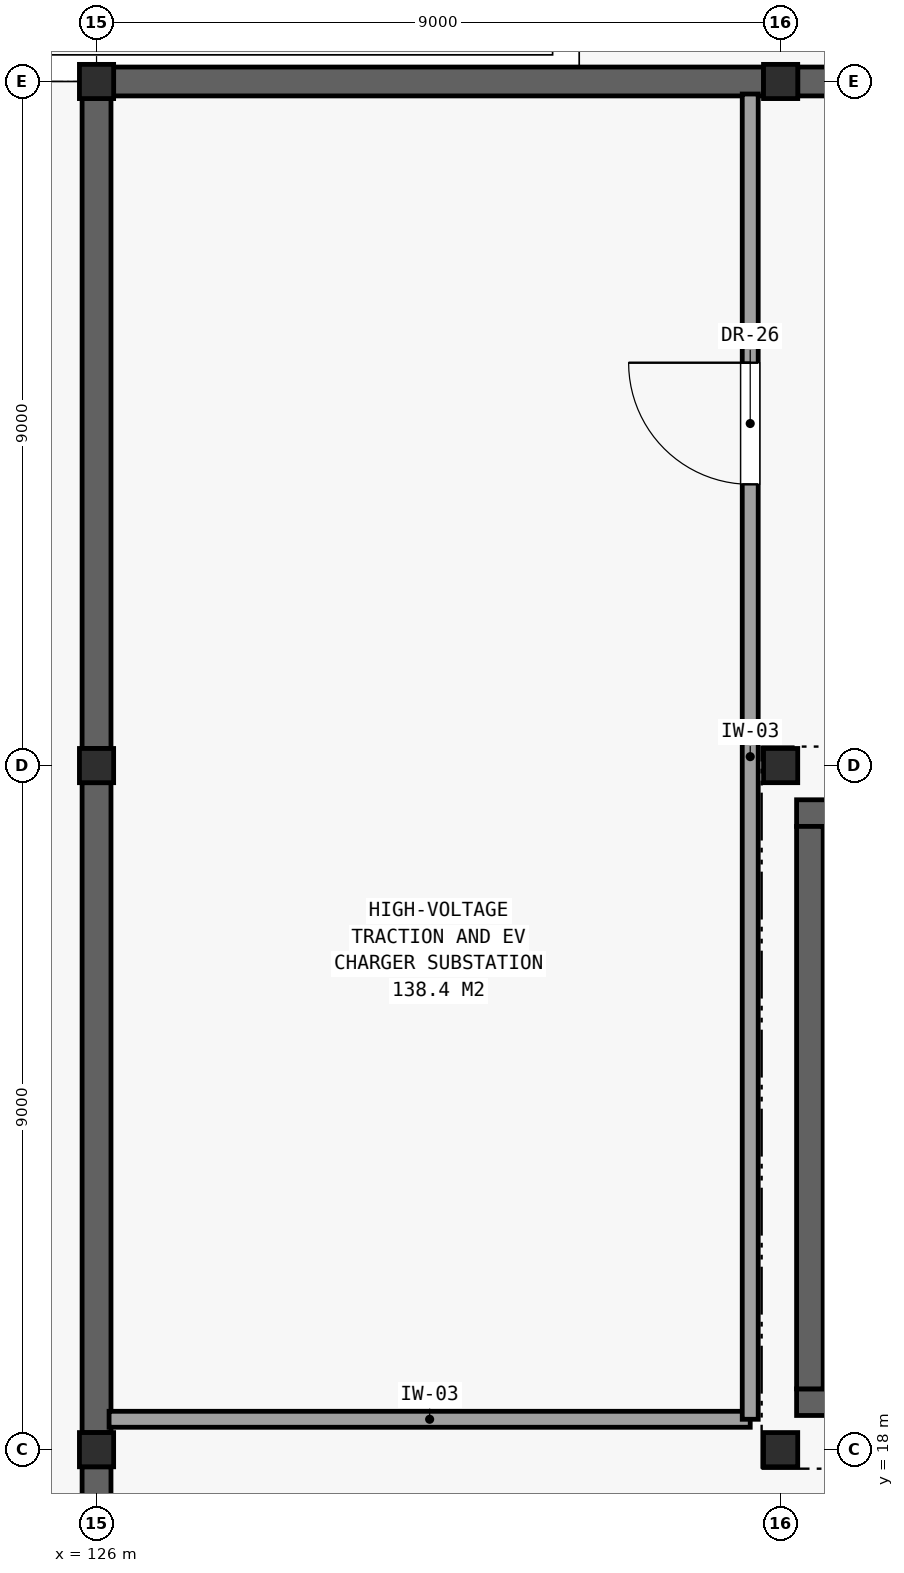
"""IFC4 building model, lengths in metres.
Left out: names, types, materials, properties, quantities, classifications, styles, units other than length and angle.
Written with IfcOpenShell. Run it as: python <this file> out.ifc"""

import sys

from ifc_helpers import new_model, si_unit, direction, frame, frame_2d, origin, origin_2d, place, context, subcontext, project, spatial, rectangle, hollow_rectangle, extrude, element, fill, save


model = new_model("IFC4")
c1 = context("Model", 3, precision=1e-05, world=origin(), true_north=direction((0.0, 1.0)))
c2 = subcontext(c1, "Body", "Model", "MODEL_VIEW")
j1 = project(units=[si_unit("LENGTHUNIT", "METRE"), si_unit("PLANEANGLEUNIT", "RADIAN")], contexts=[c1])
p1 = place(None, origin())
s1 = spatial("IfcSite", under=j1, at=p1, CompositionType="ELEMENT")
p2 = place(p1, origin())
s2 = spatial("IfcBuilding", under=s1, at=p2, CompositionType="ELEMENT")
p3 = place(p2, frame((0.0, 0.0, -4.8)))
s3 = spatial("IfcBuildingStorey", under=s2, at=p3, CompositionType="ELEMENT", Elevation=-4.8)
for number, where, z_axis, x_axis in (
    (1, (126.0, 18.0, 0.0), (0.0, 0.0, 1.0), (1.0, 0.0, 0.0)),
    (2, (126.0, 27.0, 0.0), (0.0, 0.0, 1.0), (1.0, 0.0, 0.0)),
    (3, (126.0, 36.0, 0.0), (0.0, 0.0, 1.0), (1.0, 0.0, 0.0)),
    (4, (135.0, 18.0, 0.0), (0.0, 0.0, 1.0), (1.0, 0.0, 0.0)),
    (5, (135.0, 27.0, 0.0), (0.0, 0.0, 1.0), (1.0, 0.0, 0.0)),
    (6, (135.0, 36.0, 0.0), (0.0, 0.0, 1.0), (1.0, 0.0, 0.0)),
):
    element("IfcColumn", number, at=place(p3, frame(where, z_axis=z_axis, x_axis=x_axis)), inside=s3, PredefinedType="COLUMN", context=c2, shape_type="SweptSolid", body=[
        extrude(hollow_rectangle(XDim=0.45, YDim=0.45, WallThickness=0.022, at=origin_2d()), origin(), (0.0, 0.0, 1.0), 4.8),
    ])
for number, where, z_axis, x_axis in (
    (7, (143.775, 36.0, 0.0), (0.0, 0.0, 1.0), (-1.0, 0.0, 0.0)),
    (8, (134.775, 36.0, 0.0), (0.0, 0.0, 1.0), (-1.0, 0.0, 0.0)),
    (9, (126.0, 35.775, 0.0), (0.0, 0.0, 1.0), (0.0, -1.0, 0.0)),
    (10, (126.0, 26.775, 0.0), (0.0, 0.0, 1.0), (0.0, -1.0, 0.0)),
    (11, (126.0, 17.775, 0.0), (0.0, 0.0, 1.0), (0.0, -1.0, 0.0)),
):
    element("IfcWall", number, at=place(p3, frame(where, z_axis=z_axis, x_axis=x_axis)), inside=s3, PredefinedType="USERDEFINED", context=c2, shape_type="SweptSolid", body=[
        extrude(rectangle(XDim=8.55, YDim=0.38, at=frame_2d((4.275, 0.0))), origin(), (0.0, 0.0, 1.0), 4.13),
    ])
for number, where, z_axis, x_axis in (
    (12, (135.21, 18.625, 0.0), (0.0, 0.0, 1.0), (1.0, 0.0, 0.0)),
    (13, (135.21, 26.375, 0.0), (0.0, 0.0, 1.0), (1.0, 0.0, 0.0)),
):
    element("IfcWall", number, at=place(p3, frame(where, z_axis=z_axis, x_axis=x_axis)), inside=s3, PredefinedType="SHEAR", context=c2, shape_type="SweptSolid", body=[
        extrude(rectangle(XDim=3.98, YDim=0.35, at=frame_2d((1.99, 0.0))), origin(), (0.0, 0.0, 1.0), 4.52),
    ])
p4 = place(p3, frame((135.385, 18.8, 0.0), z_axis=(0.0, 0.0, 1.0), x_axis=(0.0, 1.0, 0.0)))
e14 = element("IfcWall", 14, at=p4, inside=s3, PredefinedType="SHEAR", context=c2, shape_type="SweptSolid", body=[
    extrude(rectangle(XDim=7.4, YDim=0.35, at=frame_2d((3.7, 0.0))), origin(), (0.0, 0.0, 1.0), 4.52),
])
p5 = place(p3, frame((126.165, 18.4, 0.0), z_axis=(0.0, 0.0, 1.0), x_axis=(1.0, 0.0, 0.0)))
e15 = element("IfcWall", 15, at=p5, inside=s3, PredefinedType="PARTITIONING", context=c2, shape_type="SweptSolid", body=[
    extrude(rectangle(XDim=8.435, YDim=0.21, at=frame_2d((4.218, 0.0))), origin(), (0.0, 0.0, 1.0), 4.13),
])
p6 = place(p3, frame((134.6, 18.4, 0.0), z_axis=(0.0, 0.0, 1.0), x_axis=(0.0, 1.0, 0.0)))
e16 = element("IfcWall", 16, at=p6, inside=s3, PredefinedType="PARTITIONING", context=c2, shape_type="SweptSolid", body=[
    extrude(rectangle(XDim=17.435, YDim=0.21, at=frame_2d((8.718, 0.0))), origin(), (0.0, 0.0, 1.0), 3.92),
])
p7 = place(p6, frame((12.3, 0.0, 0.0)))
e17 = element("IfcOpeningElement", 17, at=p7, cuts=e16, PredefinedType="OPENING", context=c2, shape_type="SweptSolid", body=[
    extrude(rectangle(XDim=1.6, YDim=2.3, at=frame_2d((0.8, 1.15))), frame((0.0, 0.116, 0.0), z_axis=(0.0, -1.0, 0.0), x_axis=(1.0, 0.0, 0.0)), (0.0, 0.0, 1.0), 0.232),
])
p8 = place(p7, origin())
e18 = element("IfcDoor", 18, at=p8, inside=s3, OperationType="SINGLE_SWING_RIGHT", PredefinedType="DOOR", context=c2, shape_type="SweptSolid", body=[
    extrude(rectangle(XDim=1.6, YDim=2.3, at=frame_2d((0.8, 1.15))), frame((0.0, 0.025, 0.0), z_axis=(0.0, -1.0, 0.0), x_axis=(1.0, 0.0, 0.0)), (0.0, 0.0, 1.0), 0.05),
])
fill(e17, e18)
save(model, sys.argv[1])
